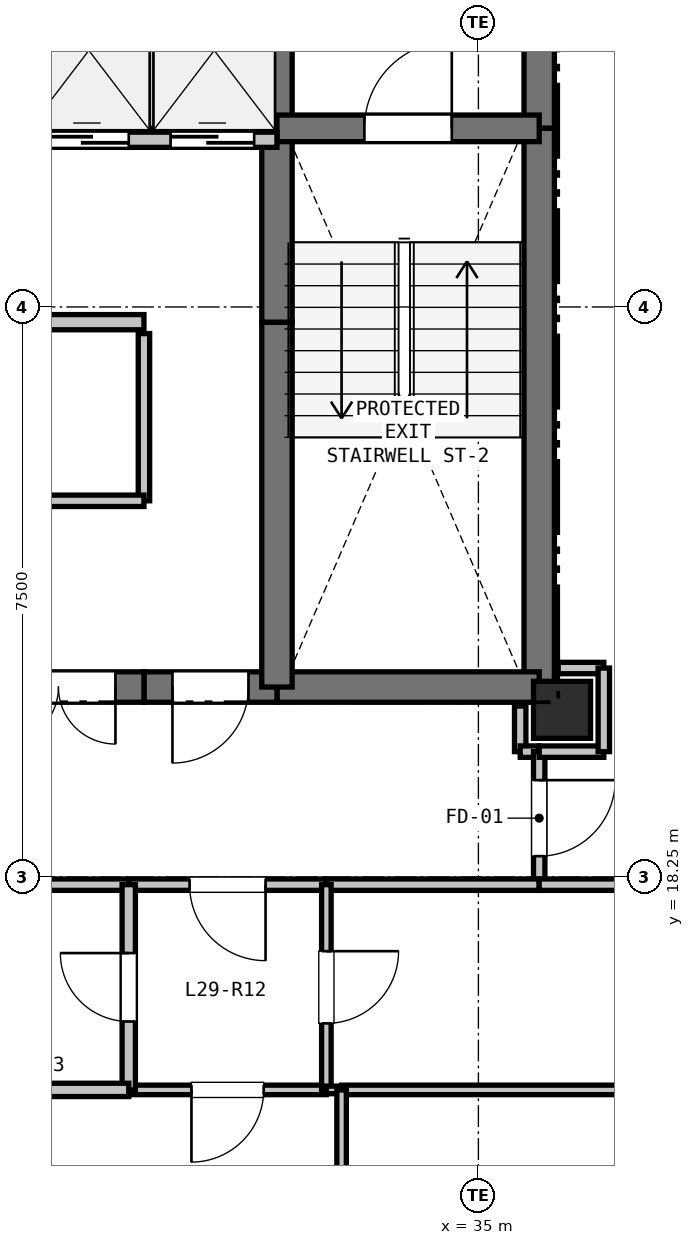
"""IFC4 building model, lengths in metres.
Left out: names, types, materials, properties, quantities, classifications, styles, units other than length and angle.
Written with IfcOpenShell. Run it as: python <this file> out.ifc"""

import sys

from ifc_helpers import new_model, si_unit, direction, frame, frame_2d, origin, origin_2d, place, context, subcontext, project, spatial, rectangle, extrude, element, fill, save


model = new_model("IFC4")
c1 = context("Model", 3, precision=1e-05, world=origin(), true_north=direction((0.0, 1.0)))
c2 = subcontext(c1, "Body", "Model", "MODEL_VIEW")
j1 = project(units=[si_unit("LENGTHUNIT", "METRE"), si_unit("PLANEANGLEUNIT", "RADIAN")], contexts=[c1])
p1 = place(None, origin())
s1 = spatial("IfcSite", under=j1, at=p1, CompositionType="ELEMENT")
p2 = place(p1, origin())
s2 = spatial("IfcBuilding", under=s1, at=p2, CompositionType="ELEMENT")
p3 = place(p2, frame((0.0, 0.0, 106.5)))
s3 = spatial("IfcBuildingStorey", under=s2, at=p3, CompositionType="ELEMENT", Elevation=106.5)
p4 = place(p3, frame((36.1, 20.45, 0.0), z_axis=(0.0, 0.0, 1.0), x_axis=(1.0, 0.0, 0.0)))
e1 = element("IfcColumn", 1, at=p4, inside=s3, PredefinedType="COLUMN", context=c2, shape_type="SweptSolid", body=[
    extrude(rectangle(XDim=0.75, YDim=0.75, at=origin_2d()), origin(), (0.0, 0.0, 1.0), 3.3),
])
p5 = place(p3, frame((35.8, 32.75, 0.0), z_axis=(0.0, 0.0, 1.0), x_axis=(0.0, -1.0, 0.0)))
e2 = element("IfcWall", 2, at=p5, inside=s3, PredefinedType="SHEAR", context=c2, shape_type="SweptSolid", body=[
    extrude(rectangle(XDim=4.65, YDim=0.4, at=frame_2d((2.325, 0.0))), origin(), (0.0, 0.0, 1.0), 3.05),
])
p6 = place(p3, frame((35.8, 28.1, 0.0), z_axis=(0.0, 0.0, 1.0), x_axis=(0.0, -1.0, 0.0)))
e3 = element("IfcWall", 3, at=p6, inside=s3, PredefinedType="SHEAR", context=c2, shape_type="SweptSolid", body=[
    extrude(rectangle(XDim=7.35, YDim=0.4, at=frame_2d((3.675, 0.0))), origin(), (0.0, 0.0, 1.0), 3.05),
])
p7 = place(p3, frame((35.8, 20.75, 0.0), z_axis=(0.0, 0.0, 1.0), x_axis=(-1.0, 0.0, 0.0)))
e4 = element("IfcWall", 4, at=p7, inside=s3, PredefinedType="SHEAR", context=c2, shape_type="SweptSolid", body=[
    extrude(rectangle(XDim=3.45, YDim=0.4, at=frame_2d((1.725, 0.0))), origin(), (0.0, 0.0, 1.0), 3.05),
])
p8 = place(p3, frame((32.35, 20.75, 0.0), z_axis=(0.0, 0.0, 1.0), x_axis=(-1.0, 0.0, 0.0)))
e5 = element("IfcWall", 5, at=p8, inside=s3, PredefinedType="SHEAR", context=c2, shape_type="SweptSolid", body=[
    extrude(rectangle(XDim=1.75, YDim=0.4, at=frame_2d((0.875, 0.0))), origin(), (0.0, 0.0, 1.0), 3.05),
])
p9 = place(p8, frame((0.375, 0.0, 0.0)))
e6 = element("IfcOpeningElement", 6, at=p9, cuts=e5, PredefinedType="OPENING", context=c2, shape_type="SweptSolid", body=[
    extrude(rectangle(XDim=1.0, YDim=2.15, at=frame_2d((0.5, 1.075))), frame((0.0, 0.21, 0.0), z_axis=(0.0, -1.0, 0.0), x_axis=(1.0, 0.0, 0.0)), (0.0, 0.0, 1.0), 0.42),
])
p10 = place(p3, frame((30.6, 20.75, 0.0), z_axis=(0.0, 0.0, 1.0), x_axis=(-1.0, 0.0, 0.0)))
e7 = element("IfcWall", 7, at=p10, inside=s3, PredefinedType="SHEAR", context=c2, shape_type="SweptSolid", body=[
    extrude(rectangle(XDim=2.25, YDim=0.4, at=frame_2d((1.125, 0.0))), origin(), (0.0, 0.0, 1.0), 3.05),
])
p11 = place(p10, frame((0.375, 0.0, 0.0)))
e8 = element("IfcOpeningElement", 8, at=p11, cuts=e7, PredefinedType="OPENING", context=c2, shape_type="SweptSolid", body=[
    extrude(rectangle(XDim=1.5, YDim=2.2, at=frame_2d((0.75, 1.1))), frame((0.0, 0.21, 0.0), z_axis=(0.0, -1.0, 0.0), x_axis=(1.0, 0.0, 0.0)), (0.0, 0.0, 1.0), 0.42),
])
p12 = place(p3, frame((32.35, 20.75, 0.0), z_axis=(0.0, 0.0, 1.0), x_axis=(0.0, 1.0, 0.0)))
e9 = element("IfcWall", 9, at=p12, inside=s3, PredefinedType="SHEAR", context=c2, shape_type="SweptSolid", body=[
    extrude(rectangle(XDim=4.8, YDim=0.4, at=frame_2d((2.4, 0.0))), origin(), (0.0, 0.0, 1.0), 3.05),
])
p13 = place(p3, frame((32.35, 25.55, 0.0), z_axis=(0.0, 0.0, 1.0), x_axis=(0.0, 1.0, 0.0)))
e10 = element("IfcWall", 10, at=p13, inside=s3, PredefinedType="SHEAR", context=c2, shape_type="SweptSolid", body=[
    extrude(rectangle(XDim=2.4, YDim=0.4, at=frame_2d((1.2, 0.0))), origin(), (0.0, 0.0, 1.0), 3.05),
])
p14 = place(p3, frame((32.35, 27.95, 0.0), z_axis=(0.0, 0.0, 1.0), x_axis=(0.0, 1.0, 0.0)))
e11 = element("IfcWall", 11, at=p14, inside=s3, PredefinedType="SHEAR", context=c2, shape_type="SweptSolid", body=[
    extrude(rectangle(XDim=2.8, YDim=0.4, at=frame_2d((1.4, 0.0))), origin(), (0.0, 0.0, 1.0), 3.05),
])
p15 = place(p3, frame((32.35, 28.1, 0.0), z_axis=(0.0, 0.0, 1.0), x_axis=(1.0, 0.0, 0.0)))
e12 = element("IfcWall", 12, at=p15, inside=s3, PredefinedType="SHEAR", context=c2, shape_type="SweptSolid", body=[
    extrude(rectangle(XDim=3.45, YDim=0.35, at=frame_2d((1.725, 0.0))), origin(), (0.0, 0.0, 1.0), 3.05),
])
p16 = place(p15, frame((1.15, 0.0, 0.0)))
e13 = element("IfcOpeningElement", 13, at=p16, cuts=e12, PredefinedType="OPENING", context=c2, shape_type="SweptSolid", body=[
    extrude(rectangle(XDim=1.15, YDim=2.15, at=frame_2d((0.575, 1.075))), frame((0.0, 0.185, 0.0), z_axis=(0.0, -1.0, 0.0), x_axis=(1.0, 0.0, 0.0)), (0.0, 0.0, 1.0), 0.37),
])
p17 = place(p3, frame((25.65, 25.55, 0.0), z_axis=(0.0, 0.0, 1.0), x_axis=(1.0, 0.0, 0.0)))
e14 = element("IfcWall", 14, at=p17, inside=s3, PredefinedType="PARTITIONING", context=c2, shape_type="SweptSolid", body=[
    extrude(rectangle(XDim=4.95, YDim=0.2, at=frame_2d((2.475, 0.0))), origin(), (0.0, 0.0, 1.0), 3.05),
])
p18 = place(p3, frame((27.4, 27.95, 0.0), z_axis=(0.0, 0.0, 1.0), x_axis=(1.0, 0.0, 0.0)))
e15 = element("IfcWall", 15, at=p18, inside=s3, PredefinedType="PARTITIONING", context=c2, shape_type="SweptSolid", body=[
    extrude(rectangle(XDim=4.95, YDim=0.2, at=frame_2d((2.475, 0.0))), origin(), (0.0, 0.0, 1.0), 3.05),
])
p19 = place(p18, frame((0.25, 0.0, 0.0)))
e16 = element("IfcOpeningElement", 16, at=p19, cuts=e15, PredefinedType="OPENING", context=c2, shape_type="SweptSolid", body=[
    extrude(rectangle(XDim=1.1, YDim=2.15, at=frame_2d((0.55, 1.075))), frame((0.0, 0.11, 0.0), z_axis=(0.0, -1.0, 0.0), x_axis=(1.0, 0.0, 0.0)), (0.0, 0.0, 1.0), 0.22),
])
p20 = place(p18, frame((1.9, 0.0, 0.0)))
e17 = element("IfcOpeningElement", 17, at=p20, cuts=e15, PredefinedType="OPENING", context=c2, shape_type="SweptSolid", body=[
    extrude(rectangle(XDim=1.1, YDim=2.15, at=frame_2d((0.55, 1.075))), frame((0.0, 0.11, 0.0), z_axis=(0.0, -1.0, 0.0), x_axis=(1.0, 0.0, 0.0)), (0.0, 0.0, 1.0), 0.22),
])
p21 = place(p18, frame((3.55, 0.0, 0.0)))
e18 = element("IfcOpeningElement", 18, at=p21, cuts=e15, PredefinedType="OPENING", context=c2, shape_type="SweptSolid", body=[
    extrude(rectangle(XDim=1.1, YDim=2.15, at=frame_2d((0.55, 1.075))), frame((0.0, 0.11, 0.0), z_axis=(0.0, -1.0, 0.0), x_axis=(1.0, 0.0, 0.0)), (0.0, 0.0, 1.0), 0.22),
])
p22 = place(p3, frame((30.6, 25.4, 0.0), z_axis=(0.0, 0.0, 1.0), x_axis=(0.0, -1.0, 0.0)))
e19 = element("IfcWall", 19, at=p22, inside=s3, PredefinedType="PARTITIONING", context=c2, shape_type="SweptSolid", body=[
    extrude(rectangle(XDim=2.2, YDim=0.15, at=frame_2d((1.1, 0.0))), origin(), (0.0, 0.0, 1.0), 3.05),
])
p23 = place(p3, frame((30.6, 23.2, 0.0), z_axis=(0.0, 0.0, 1.0), x_axis=(-1.0, 0.0, 0.0)))
e20 = element("IfcWall", 20, at=p23, inside=s3, PredefinedType="PARTITIONING", context=c2, shape_type="SweptSolid", body=[
    extrude(rectangle(XDim=1.65, YDim=0.15, at=frame_2d((0.825, 0.0))), origin(), (0.0, 0.0, 1.0), 3.05),
])
p24 = place(p3, frame((30.7, 30.3, 0.0), z_axis=(0.0, 0.0, 1.0), x_axis=(0.0, -1.0, 0.0)))
e21 = element("IfcWall", 21, at=p24, inside=s3, PredefinedType="PARTITIONING", context=c2, shape_type="SweptSolid", body=[
    extrude(rectangle(XDim=2.2, YDim=0.125, at=frame_2d((1.1, 0.0))), origin(), (0.0, 0.0, 1.0), 3.05),
])
p25 = place(p3, frame((35.55, 20.5, 0.0), z_axis=(0.0, 0.0, 1.0), x_axis=(0.0, -1.0, 0.0)))
e22 = element("IfcWall", 22, at=p25, inside=s3, PredefinedType="PARTITIONING", context=c2, shape_type="SweptSolid", body=[
    extrude(rectangle(XDim=0.6, YDim=0.15, at=frame_2d((0.3, 0.0))), origin(), (0.0, 0.0, 1.0), 2.498),
])
p26 = place(p3, frame((35.55, 19.9, 0.0), z_axis=(0.0, 0.0, 1.0), x_axis=(1.0, 0.0, 0.0)))
e23 = element("IfcWall", 23, at=p26, inside=s3, PredefinedType="PARTITIONING", context=c2, shape_type="SweptSolid", body=[
    extrude(rectangle(XDim=0.25, YDim=0.15, at=frame_2d((0.125, 0.0))), origin(), (0.0, 0.0, 1.0), 3.05),
])
p27 = place(p3, frame((35.8, 19.9, 0.0), z_axis=(0.0, 0.0, 1.0), x_axis=(0.0, -1.0, 0.0)))
e24 = element("IfcWall", 24, at=p27, inside=s3, PredefinedType="PARTITIONING", context=c2, shape_type="SweptSolid", body=[
    extrude(rectangle(XDim=1.75, YDim=0.15, at=frame_2d((0.875, 0.0))), origin(), (0.0, 0.0, 1.0), 3.05),
])
p28 = place(p27, frame((0.375, 0.0, 0.0)))
e25 = element("IfcOpeningElement", 25, at=p28, cuts=e24, PredefinedType="OPENING", context=c2, shape_type="SweptSolid", body=[
    extrude(rectangle(XDim=1.0, YDim=2.15, at=frame_2d((0.5, 1.075))), frame((0.0, 0.085, 0.0), z_axis=(0.0, -1.0, 0.0), x_axis=(1.0, 0.0, 0.0)), (0.0, 0.0, 1.0), 0.17),
])
p29 = place(p3, frame((35.8, 18.15, 0.0), z_axis=(0.0, 0.0, 1.0), x_axis=(-1.0, 0.0, 0.0)))
e26 = element("IfcWall", 26, at=p29, inside=s3, PredefinedType="PARTITIONING", context=c2, shape_type="SweptSolid", body=[
    extrude(rectangle(XDim=2.8, YDim=0.15, at=frame_2d((1.4, 0.0))), origin(), (0.0, 0.0, 1.0), 3.05),
])
p30 = place(p3, frame((33.0, 18.15, 0.0), z_axis=(0.0, 0.0, 1.0), x_axis=(-1.0, 0.0, 0.0)))
e27 = element("IfcWall", 27, at=p30, inside=s3, PredefinedType="PARTITIONING", context=c2, shape_type="SweptSolid", body=[
    extrude(rectangle(XDim=2.6, YDim=0.15, at=frame_2d((1.3, 0.0))), origin(), (0.0, 0.0, 1.0), 3.05),
])
p31 = place(p30, frame((0.8, 0.0, 0.0)))
e28 = element("IfcOpeningElement", 28, at=p31, cuts=e27, PredefinedType="OPENING", context=c2, shape_type="SweptSolid", body=[
    extrude(rectangle(XDim=1.0, YDim=2.15, at=frame_2d((0.5, 1.075))), frame((0.0, 0.085, 0.0), z_axis=(0.0, -1.0, 0.0), x_axis=(1.0, 0.0, 0.0)), (0.0, 0.0, 1.0), 0.17),
])
p32 = place(p3, frame((30.4, 18.15, 0.0), z_axis=(0.0, 0.0, 1.0), x_axis=(-1.0, 0.0, 0.0)))
e29 = element("IfcWall", 29, at=p32, inside=s3, PredefinedType="PARTITIONING", context=c2, shape_type="SweptSolid", body=[
    extrude(rectangle(XDim=2.0, YDim=0.15, at=frame_2d((1.0, 0.0))), origin(), (0.0, 0.0, 1.0), 3.05),
])
p33 = place(p3, frame((36.65, 21.0, 0.0), z_axis=(0.0, 0.0, 1.0), x_axis=(-1.0, 0.0, 0.0)))
e30 = element("IfcWall", 30, at=p33, inside=s3, PredefinedType="PARTITIONING", context=c2, shape_type="SweptSolid", body=[
    extrude(rectangle(XDim=0.6, YDim=0.15, at=frame_2d((0.3, 0.0))), origin(), (0.0, 0.0, 1.0), 2.498),
])
p34 = place(p3, frame((38.4, 18.15, 0.0), z_axis=(0.0, 0.0, 1.0), x_axis=(-1.0, 0.0, 0.0)))
e31 = element("IfcWall", 31, at=p34, inside=s3, PredefinedType="PARTITIONING", context=c2, shape_type="SweptSolid", body=[
    extrude(rectangle(XDim=2.6, YDim=0.15, at=frame_2d((1.3, 0.0))), origin(), (0.0, 0.0, 1.0), 2.423),
])
p35 = place(p3, frame((35.8, 19.9, 0.0), z_axis=(0.0, 0.0, 1.0), x_axis=(1.0, 0.0, 0.0)))
e32 = element("IfcWall", 32, at=p35, inside=s3, PredefinedType="PARTITIONING", context=c2, shape_type="SweptSolid", body=[
    extrude(rectangle(XDim=0.85, YDim=0.15, at=frame_2d((0.425, 0.0))), origin(), (0.0, 0.0, 1.0), 2.423),
])
p36 = place(p3, frame((36.65, 19.9, 0.0), z_axis=(0.0, 0.0, 1.0), x_axis=(0.0, 1.0, 0.0)))
e33 = element("IfcWall", 33, at=p36, inside=s3, PredefinedType="PARTITIONING", context=c2, shape_type="SweptSolid", body=[
    extrude(rectangle(XDim=1.1, YDim=0.15, at=frame_2d((0.55, 0.0))), origin(), (0.0, 0.0, 1.0), 3.05),
])
p37 = place(p3, frame((33.0, 15.45, 0.0), z_axis=(0.0, 0.0, 1.0), x_axis=(-1.0, 0.0, 0.0)))
e34 = element("IfcWall", 34, at=p37, inside=s3, PredefinedType="PARTITIONING", context=c2, shape_type="SweptSolid", body=[
    extrude(rectangle(XDim=2.6, YDim=0.125, at=frame_2d((1.3, 0.0))), origin(), (0.0, 0.0, 1.0), 3.05),
])
p38 = place(p37, frame((0.825, 0.0, 0.0)))
e35 = element("IfcOpeningElement", 35, at=p38, cuts=e34, PredefinedType="OPENING", context=c2, shape_type="SweptSolid", body=[
    extrude(rectangle(XDim=0.95, YDim=2.1, at=frame_2d((0.475, 1.05))), frame((0.0, 0.073, 0.0), z_axis=(0.0, -1.0, 0.0), x_axis=(1.0, 0.0, 0.0)), (0.0, 0.0, 1.0), 0.145),
])
p39 = place(p3, frame((30.4, 15.45, 0.0), z_axis=(0.0, 0.0, 1.0), x_axis=(0.0, 1.0, 0.0)))
e36 = element("IfcWall", 36, at=p39, inside=s3, PredefinedType="PLUMBINGWALL", context=c2, shape_type="SweptSolid", body=[
    extrude(rectangle(XDim=2.7, YDim=0.175, at=frame_2d((1.35, 0.0))), origin(), (0.0, 0.0, 1.0), 3.05),
])
p40 = place(p39, frame((0.9, 0.0, 0.0)))
e37 = element("IfcOpeningElement", 37, at=p40, cuts=e36, PredefinedType="OPENING", context=c2, shape_type="SweptSolid", body=[
    extrude(rectangle(XDim=0.9, YDim=2.1, at=frame_2d((0.45, 1.05))), frame((0.0, 0.097, 0.0), z_axis=(0.0, -1.0, 0.0), x_axis=(1.0, 0.0, 0.0)), (0.0, 0.0, 1.0), 0.195),
])
p41 = place(p3, frame((33.0, 18.15, 0.0), z_axis=(0.0, 0.0, 1.0), x_axis=(0.0, -1.0, 0.0)))
e38 = element("IfcWall", 38, at=p41, inside=s3, PredefinedType="PARTITIONING", context=c2, shape_type="SweptSolid", body=[
    extrude(rectangle(XDim=2.7, YDim=0.125, at=frame_2d((1.35, 0.0))), origin(), (0.0, 0.0, 1.0), 3.05),
])
p42 = place(p41, frame((0.875, 0.0, 0.0)))
e39 = element("IfcOpeningElement", 39, at=p42, cuts=e38, PredefinedType="OPENING", context=c2, shape_type="SweptSolid", body=[
    extrude(rectangle(XDim=0.95, YDim=2.1, at=frame_2d((0.475, 1.05))), frame((0.0, 0.073, 0.0), z_axis=(0.0, -1.0, 0.0), x_axis=(1.0, 0.0, 0.0)), (0.0, 0.0, 1.0), 0.145),
])
p43 = place(p3, frame((30.4, 15.45, 0.0), z_axis=(0.0, 0.0, 1.0), x_axis=(-1.0, 0.0, 0.0)))
e40 = element("IfcWall", 40, at=p43, inside=s3, PredefinedType="PLUMBINGWALL", context=c2, shape_type="SweptSolid", body=[
    extrude(rectangle(XDim=2.0, YDim=0.175, at=frame_2d((1.0, 0.0))), origin(), (0.0, 0.0, 1.0), 3.05),
])
p44 = place(p3, frame((42.885, 15.45, 0.0), z_axis=(0.0, 0.0, 1.0), x_axis=(-1.0, 0.0, 0.0)))
e41 = element("IfcWall", 41, at=p44, inside=s3, PredefinedType="PARTITIONING", context=c2, shape_type="SweptSolid", body=[
    extrude(rectangle(XDim=9.686, YDim=0.125, at=frame_2d((4.843, 0.0))), origin(), (0.0, 0.0, 1.0), 2.365),
])
p45 = place(p44, frame((4.368, 0.0, 0.0)))
e42 = element("IfcOpeningElement", 42, at=p45, cuts=e41, PredefinedType="OPENING", context=c2, shape_type="SweptSolid", body=[
    extrude(rectangle(XDim=0.95, YDim=2.1, at=frame_2d((0.475, 1.05))), frame((0.0, 0.073, 0.0), z_axis=(0.0, -1.0, 0.0), x_axis=(1.0, 0.0, 0.0)), (0.0, 0.0, 1.0), 0.145),
])
p46 = place(p3, frame((33.2, 15.45, 0.0), z_axis=(0.0, 0.0, 1.0), x_axis=(-1.0, 0.0, 0.0)))
e43 = element("IfcWall", 43, at=p46, inside=s3, PredefinedType="PARTITIONING", context=c2, shape_type="SweptSolid", body=[
    extrude(rectangle(XDim=0.2, YDim=0.1, at=frame_2d((0.1, 0.0))), origin(), (0.0, 0.0, 1.0), 3.05),
])
p47 = place(p3, frame((33.2, 15.45, 0.0), z_axis=(0.0, 0.0, 1.0), x_axis=(0.0, -1.0, 0.0)))
e44 = element("IfcWall", 44, at=p47, inside=s3, PredefinedType="PARTITIONING", context=c2, shape_type="SweptSolid", body=[
    extrude(rectangle(XDim=5.28, YDim=0.125, at=frame_2d((2.64, 0.0))), origin(), (0.0, 0.0, 1.0), 3.05),
])
p48 = place(p47, frame((2.165, 0.0, 0.0)))
e45 = element("IfcOpeningElement", 45, at=p48, cuts=e44, PredefinedType="OPENING", context=c2, shape_type="SweptSolid", body=[
    extrude(rectangle(XDim=0.95, YDim=2.1, at=frame_2d((0.475, 1.05))), frame((0.0, 0.073, 0.0), z_axis=(0.0, -1.0, 0.0), x_axis=(1.0, 0.0, 0.0)), (0.0, 0.0, 1.0), 0.145),
])
p49 = place(p20, origin())
e46 = element("IfcDoor", 46, at=p49, inside=s3, OperationType="SLIDING_TO_LEFT", PredefinedType="DOOR", context=c2, shape_type="SweptSolid", body=[
    extrude(rectangle(XDim=1.1, YDim=2.15, at=frame_2d((0.55, 1.075))), frame((0.0, 0.025, 0.0), z_axis=(0.0, -1.0, 0.0), x_axis=(1.0, 0.0, 0.0)), (0.0, 0.0, 1.0), 0.05),
])
fill(e17, e46)
p50 = place(p21, origin())
e47 = element("IfcDoor", 47, at=p50, inside=s3, OperationType="SLIDING_TO_LEFT", PredefinedType="DOOR", context=c2, shape_type="SweptSolid", body=[
    extrude(rectangle(XDim=1.1, YDim=2.15, at=frame_2d((0.55, 1.075))), frame((0.0, 0.025, 0.0), z_axis=(0.0, -1.0, 0.0), x_axis=(1.0, 0.0, 0.0)), (0.0, 0.0, 1.0), 0.05),
])
fill(e18, e47)
p51 = place(p9, origin())
e48 = element("IfcDoor", 48, at=p51, inside=s3, OperationType="SINGLE_SWING_RIGHT", PredefinedType="DOOR", context=c2, shape_type="SweptSolid", body=[
    extrude(rectangle(XDim=1.0, YDim=2.15, at=frame_2d((0.5, 1.075))), frame((0.0, 0.025, 0.0), z_axis=(0.0, -1.0, 0.0), x_axis=(1.0, 0.0, 0.0)), (0.0, 0.0, 1.0), 0.05),
])
fill(e6, e48)
p52 = place(p16, origin())
e49 = element("IfcDoor", 49, at=p52, inside=s3, OperationType="SINGLE_SWING_RIGHT", PredefinedType="DOOR", context=c2, shape_type="SweptSolid", body=[
    extrude(rectangle(XDim=1.15, YDim=2.15, at=frame_2d((0.575, 1.075))), frame((0.0, 0.025, 0.0), z_axis=(0.0, -1.0, 0.0), x_axis=(1.0, 0.0, 0.0)), (0.0, 0.0, 1.0), 0.05),
])
fill(e13, e49)
p53 = place(p11, origin())
e50 = element("IfcDoor", 50, at=p53, inside=s3, OperationType="DOUBLE_DOOR_SINGLE_SWING", PredefinedType="DOOR", context=c2, shape_type="SweptSolid", body=[
    extrude(rectangle(XDim=1.5, YDim=2.2, at=frame_2d((0.75, 1.1))), frame((0.0, 0.025, 0.0), z_axis=(0.0, -1.0, 0.0), x_axis=(1.0, 0.0, 0.0)), (0.0, 0.0, 1.0), 0.05),
])
fill(e8, e50)
p54 = place(p28, origin())
e51 = element("IfcDoor", 51, at=p54, inside=s3, OperationType="SINGLE_SWING_LEFT", PredefinedType="DOOR", context=c2, shape_type="SweptSolid", body=[
    extrude(rectangle(XDim=1.0, YDim=2.15, at=frame_2d((0.5, 1.075))), frame((0.0, 0.025, 0.0), z_axis=(0.0, -1.0, 0.0), x_axis=(1.0, 0.0, 0.0)), (0.0, 0.0, 1.0), 0.05),
])
fill(e25, e51)
p55 = place(p31, origin())
e52 = element("IfcDoor", 52, at=p55, inside=s3, OperationType="SINGLE_SWING_LEFT", PredefinedType="DOOR", context=c2, shape_type="SweptSolid", body=[
    extrude(rectangle(XDim=1.0, YDim=2.15, at=frame_2d((0.5, 1.075))), frame((0.0, 0.025, 0.0), z_axis=(0.0, -1.0, 0.0), x_axis=(1.0, 0.0, 0.0)), (0.0, 0.0, 1.0), 0.05),
])
fill(e28, e52)
p56 = place(p40, origin())
e53 = element("IfcDoor", 53, at=p56, inside=s3, OperationType="SINGLE_SWING_RIGHT", PredefinedType="DOOR", context=c2, shape_type="SweptSolid", body=[
    extrude(rectangle(XDim=0.9, YDim=2.1, at=frame_2d((0.45, 1.05))), frame((0.0, 0.025, 0.0), z_axis=(0.0, -1.0, 0.0), x_axis=(1.0, 0.0, 0.0)), (0.0, 0.0, 1.0), 0.05),
])
fill(e37, e53)
p57 = place(p42, origin())
e54 = element("IfcDoor", 54, at=p57, inside=s3, OperationType="SINGLE_SWING_LEFT", PredefinedType="DOOR", context=c2, shape_type="SweptSolid", body=[
    extrude(rectangle(XDim=0.95, YDim=2.1, at=frame_2d((0.475, 1.05))), frame((0.0, 0.025, 0.0), z_axis=(0.0, -1.0, 0.0), x_axis=(1.0, 0.0, 0.0)), (0.0, 0.0, 1.0), 0.05),
])
fill(e39, e54)
p58 = place(p38, origin())
e55 = element("IfcDoor", 55, at=p58, inside=s3, OperationType="SINGLE_SWING_RIGHT", PredefinedType="DOOR", context=c2, shape_type="SweptSolid", body=[
    extrude(rectangle(XDim=0.95, YDim=2.1, at=frame_2d((0.475, 1.05))), frame((0.0, 0.025, 0.0), z_axis=(0.0, -1.0, 0.0), x_axis=(1.0, 0.0, 0.0)), (0.0, 0.0, 1.0), 0.05),
])
fill(e35, e55)
save(model, sys.argv[1])
